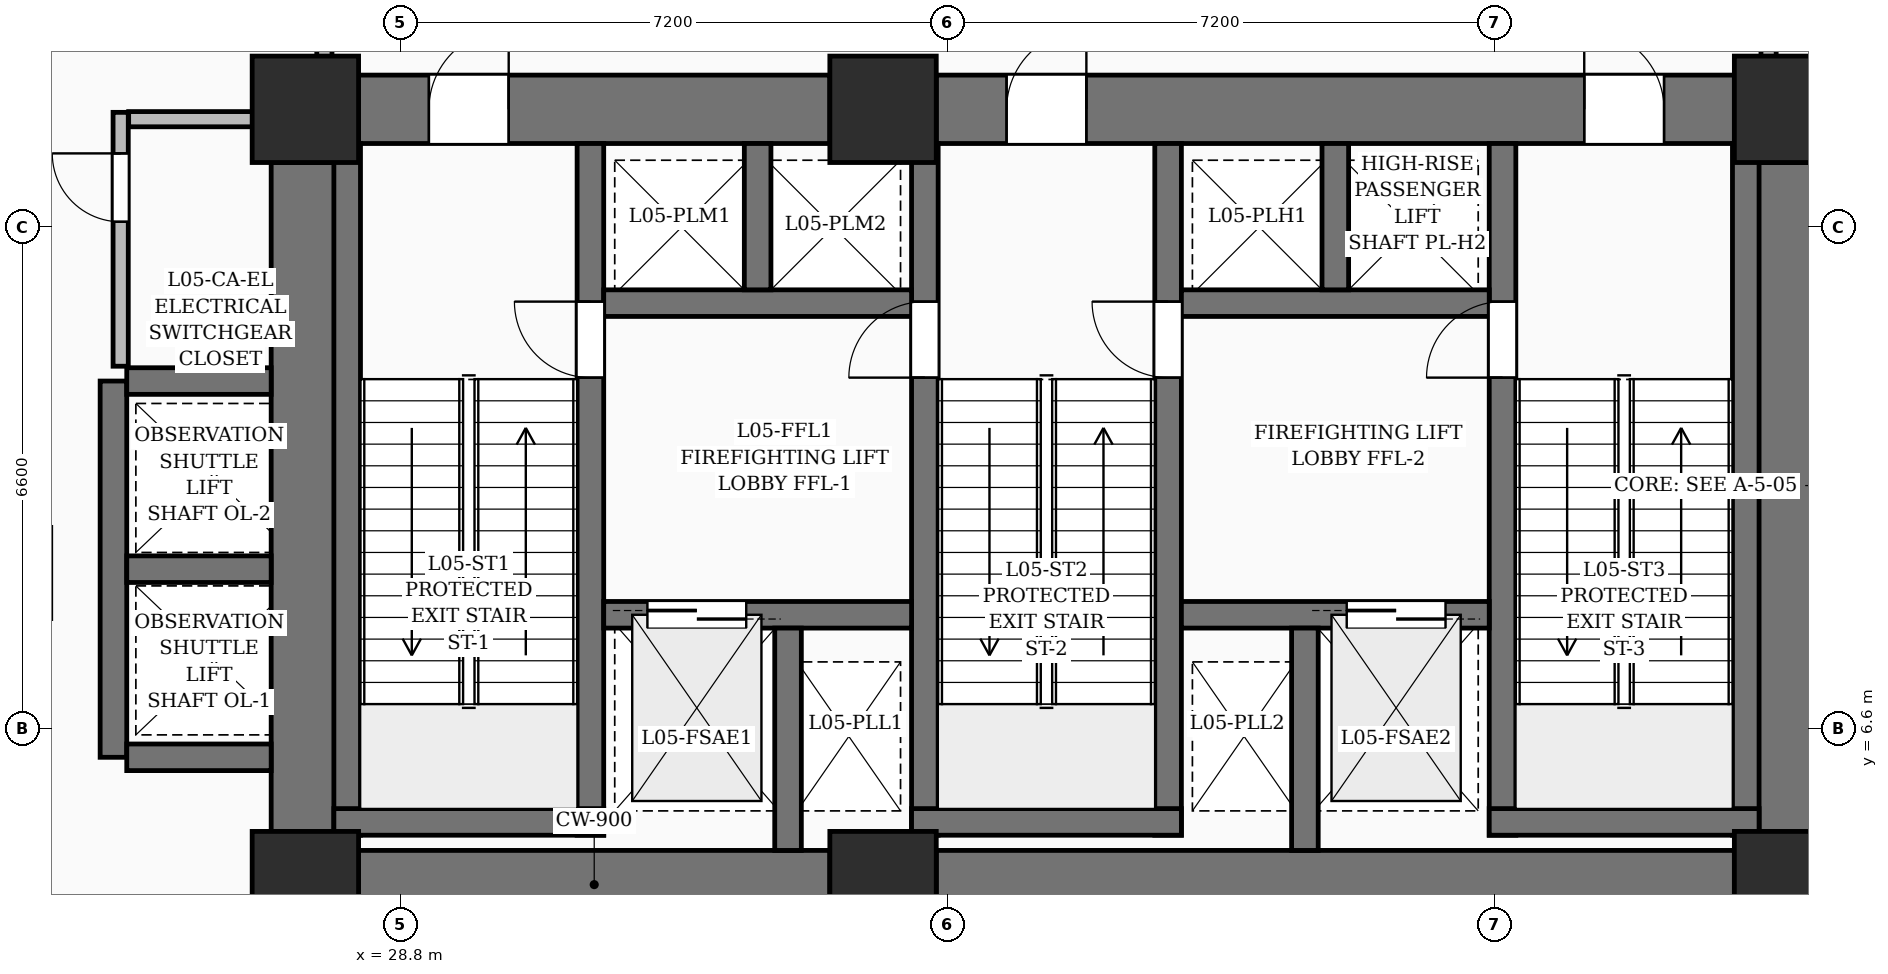
"""IFC4 building model, lengths in metres.
Left out: names, types, materials, properties, quantities, classifications, styles, units other than length and angle.
Written with IfcOpenShell. Run it as: python <this file> out.ifc"""

import sys

from ifc_helpers import new_model, si_unit, direction, frame, frame_2d, origin, origin_2d, place, context, subcontext, project, spatial, rectangle, extrude, element, fill, save


model = new_model("IFC4")
c1 = context("Model", 3, precision=1e-05, world=origin(), true_north=direction((0.0, 1.0)))
c2 = subcontext(c1, "Body", "Model", "MODEL_VIEW")
j1 = project(units=[si_unit("LENGTHUNIT", "METRE"), si_unit("PLANEANGLEUNIT", "RADIAN")], contexts=[c1])
p1 = place(None, origin())
s1 = spatial("IfcSite", under=j1, at=p1, CompositionType="ELEMENT")
p2 = place(p1, origin())
s2 = spatial("IfcBuilding", under=s1, at=p2, CompositionType="ELEMENT")
p3 = place(p2, frame((0.0, 0.0, 26.4)))
s3 = spatial("IfcBuildingStorey", under=s2, at=p3, CompositionType="ELEMENT", Elevation=26.4)
for number, where, z_axis, x_axis in (
    (1, (27.55, 4.55, 0.0), (0.0, 0.0, 1.0), (1.0, 0.0, 0.0)),
    (2, (35.15, 4.55, 0.0), (0.0, 0.0, 1.0), (1.0, 0.0, 0.0)),
    (3, (47.05, 4.55, 0.0), (0.0, 0.0, 1.0), (1.0, 0.0, 0.0)),
    (4, (27.55, 14.75, 0.0), (0.0, 0.0, 1.0), (1.0, 0.0, 0.0)),
    (5, (35.15, 14.75, 0.0), (0.0, 0.0, 1.0), (1.0, 0.0, 0.0)),
    (6, (47.05, 14.75, 0.0), (0.0, 0.0, 1.0), (1.0, 0.0, 0.0)),
):
    element("IfcColumn", number, at=place(p3, frame(where, z_axis=z_axis, x_axis=x_axis)), inside=s3, PredefinedType="COLUMN", context=c2, shape_type="SweptSolid", body=[
        extrude(rectangle(XDim=1.4, YDim=1.4, at=origin_2d()), origin(), (0.0, 0.0, 1.0), 5.4),
    ])
p4 = place(p3, frame((28.25, 4.55, 0.0), z_axis=(0.0, 0.0, 1.0), x_axis=(1.0, 0.0, 0.0)))
e7 = element("IfcWall", 7, at=p4, inside=s3, PredefinedType="SHEAR", context=c2, shape_type="SweptSolid", body=[
    extrude(rectangle(XDim=6.2, YDim=0.9, at=frame_2d((3.1, 0.0))), origin(), (0.0, 0.0, 1.0), 5.4),
])
p5 = place(p3, frame((35.85, 4.55, 0.0), z_axis=(0.0, 0.0, 1.0), x_axis=(1.0, 0.0, 0.0)))
e8 = element("IfcWall", 8, at=p5, inside=s3, PredefinedType="SHEAR", context=c2, shape_type="SweptSolid", body=[
    extrude(rectangle(XDim=10.5, YDim=0.9, at=frame_2d((5.25, 0.0))), origin(), (0.0, 0.0, 1.0), 5.4),
])
p6 = place(p3, frame((28.25, 14.75, 0.0), z_axis=(0.0, 0.0, 1.0), x_axis=(1.0, 0.0, 0.0)))
e9 = element("IfcWall", 9, at=p6, inside=s3, PredefinedType="SHEAR", context=c2, shape_type="SweptSolid", body=[
    extrude(rectangle(XDim=6.2, YDim=0.9, at=frame_2d((3.1, 0.0))), origin(), (0.0, 0.0, 1.0), 5.4),
])
p7 = place(p6, frame((0.925, 0.0, 0.0)))
e10 = element("IfcOpeningElement", 10, at=p7, cuts=e9, PredefinedType="OPENING", context=c2, shape_type="SweptSolid", body=[
    extrude(rectangle(XDim=1.05, YDim=2.15, at=frame_2d((0.525, 1.075))), frame((0.0, 0.46, 0.0), z_axis=(0.0, -1.0, 0.0), x_axis=(1.0, 0.0, 0.0)), (0.0, 0.0, 1.0), 0.92),
])
p8 = place(p3, frame((35.85, 14.75, 0.0), z_axis=(0.0, 0.0, 1.0), x_axis=(1.0, 0.0, 0.0)))
e11 = element("IfcWall", 11, at=p8, inside=s3, PredefinedType="SHEAR", context=c2, shape_type="SweptSolid", body=[
    extrude(rectangle(XDim=10.5, YDim=0.9, at=frame_2d((5.25, 0.0))), origin(), (0.0, 0.0, 1.0), 5.4),
])
p9 = place(p8, frame((0.925, 0.0, 0.0)))
e12 = element("IfcOpeningElement", 12, at=p9, cuts=e11, PredefinedType="OPENING", context=c2, shape_type="SweptSolid", body=[
    extrude(rectangle(XDim=1.05, YDim=2.15, at=frame_2d((0.525, 1.075))), frame((0.0, 0.46, 0.0), z_axis=(0.0, -1.0, 0.0), x_axis=(1.0, 0.0, 0.0)), (0.0, 0.0, 1.0), 0.92),
])
p10 = place(p8, frame((8.525, 0.0, 0.0)))
e13 = element("IfcOpeningElement", 13, at=p10, cuts=e11, PredefinedType="OPENING", context=c2, shape_type="SweptSolid", body=[
    extrude(rectangle(XDim=1.05, YDim=2.15, at=frame_2d((0.525, 1.075))), frame((0.0, 0.46, 0.0), z_axis=(0.0, -1.0, 0.0), x_axis=(1.0, 0.0, 0.0)), (0.0, 0.0, 1.0), 0.92),
])
for number, where, z_axis, x_axis in (
    (14, (27.55, 5.25, 0.0), (0.0, 0.0, 1.0), (0.0, 1.0, 0.0)),
    (15, (47.05, 5.25, 0.0), (0.0, 0.0, 1.0), (0.0, 1.0, 0.0)),
):
    element("IfcWall", number, at=place(p3, frame(where, z_axis=z_axis, x_axis=x_axis)), inside=s3, PredefinedType="SHEAR", context=c2, shape_type="SweptSolid", body=[
        extrude(rectangle(XDim=8.8, YDim=0.9, at=frame_2d((4.4, 0.0))), origin(), (0.0, 0.0, 1.0), 5.4),
    ])
p11 = place(p3, frame((28.1, 5.2, 0.0), z_axis=(0.0, 0.0, 1.0), x_axis=(0.0, 1.0, 0.0)))
e16 = element("IfcWall", 16, at=p11, inside=s3, PredefinedType="SOLIDWALL", context=c2, shape_type="SweptSolid", body=[
    extrude(rectangle(XDim=9.1, YDim=0.35, at=frame_2d((4.55, 0.0))), origin(), (0.0, 0.0, 1.0), 5.4),
])
p12 = place(p3, frame((31.3, 5.2, 0.0), z_axis=(0.0, 0.0, 1.0), x_axis=(0.0, 1.0, 0.0)))
e17 = element("IfcWall", 17, at=p12, inside=s3, PredefinedType="SOLIDWALL", context=c2, shape_type="SweptSolid", body=[
    extrude(rectangle(XDim=9.1, YDim=0.35, at=frame_2d((4.55, 0.0))), origin(), (0.0, 0.0, 1.0), 5.4),
])
p13 = place(p12, frame((6.02, 0.0, 0.0)))
e18 = element("IfcOpeningElement", 18, at=p13, cuts=e17, PredefinedType="OPENING", context=c2, shape_type="SweptSolid", body=[
    extrude(rectangle(XDim=1.0, YDim=2.15, at=frame_2d((0.5, 1.075))), frame((0.0, 0.185, 0.0), z_axis=(0.0, -1.0, 0.0), x_axis=(1.0, 0.0, 0.0)), (0.0, 0.0, 1.0), 0.37),
])
p14 = place(p3, frame((27.925, 5.375, 0.0), z_axis=(0.0, 0.0, 1.0), x_axis=(1.0, 0.0, 0.0)))
e19 = element("IfcWall", 19, at=p14, inside=s3, PredefinedType="SOLIDWALL", context=c2, shape_type="SweptSolid", body=[
    extrude(rectangle(XDim=3.55, YDim=0.35, at=frame_2d((1.775, 0.0))), origin(), (0.0, 0.0, 1.0), 5.4),
])
p15 = place(p3, frame((35.7, 5.2, 0.0), z_axis=(0.0, 0.0, 1.0), x_axis=(0.0, 1.0, 0.0)))
e20 = element("IfcWall", 20, at=p15, inside=s3, PredefinedType="SOLIDWALL", context=c2, shape_type="SweptSolid", body=[
    extrude(rectangle(XDim=9.1, YDim=0.35, at=frame_2d((4.55, 0.0))), origin(), (0.0, 0.0, 1.0), 5.4),
])
p16 = place(p15, frame((6.02, 0.0, 0.0)))
e21 = element("IfcOpeningElement", 21, at=p16, cuts=e20, PredefinedType="OPENING", context=c2, shape_type="SweptSolid", body=[
    extrude(rectangle(XDim=1.0, YDim=2.15, at=frame_2d((0.5, 1.075))), frame((0.0, 0.185, 0.0), z_axis=(0.0, -1.0, 0.0), x_axis=(1.0, 0.0, 0.0)), (0.0, 0.0, 1.0), 0.37),
])
p17 = place(p3, frame((38.9, 5.2, 0.0), z_axis=(0.0, 0.0, 1.0), x_axis=(0.0, 1.0, 0.0)))
e22 = element("IfcWall", 22, at=p17, inside=s3, PredefinedType="SOLIDWALL", context=c2, shape_type="SweptSolid", body=[
    extrude(rectangle(XDim=9.1, YDim=0.35, at=frame_2d((4.55, 0.0))), origin(), (0.0, 0.0, 1.0), 5.4),
])
p18 = place(p17, frame((6.02, 0.0, 0.0)))
e23 = element("IfcOpeningElement", 23, at=p18, cuts=e22, PredefinedType="OPENING", context=c2, shape_type="SweptSolid", body=[
    extrude(rectangle(XDim=1.0, YDim=2.15, at=frame_2d((0.5, 1.075))), frame((0.0, 0.185, 0.0), z_axis=(0.0, -1.0, 0.0), x_axis=(1.0, 0.0, 0.0)), (0.0, 0.0, 1.0), 0.37),
])
p19 = place(p3, frame((35.525, 5.375, 0.0), z_axis=(0.0, 0.0, 1.0), x_axis=(1.0, 0.0, 0.0)))
e24 = element("IfcWall", 24, at=p19, inside=s3, PredefinedType="SOLIDWALL", context=c2, shape_type="SweptSolid", body=[
    extrude(rectangle(XDim=3.55, YDim=0.35, at=frame_2d((1.775, 0.0))), origin(), (0.0, 0.0, 1.0), 5.4),
])
p20 = place(p3, frame((43.3, 5.2, 0.0), z_axis=(0.0, 0.0, 1.0), x_axis=(0.0, 1.0, 0.0)))
e25 = element("IfcWall", 25, at=p20, inside=s3, PredefinedType="SOLIDWALL", context=c2, shape_type="SweptSolid", body=[
    extrude(rectangle(XDim=9.1, YDim=0.35, at=frame_2d((4.55, 0.0))), origin(), (0.0, 0.0, 1.0), 5.4),
])
p21 = place(p20, frame((6.02, 0.0, 0.0)))
e26 = element("IfcOpeningElement", 26, at=p21, cuts=e25, PredefinedType="OPENING", context=c2, shape_type="SweptSolid", body=[
    extrude(rectangle(XDim=1.0, YDim=2.15, at=frame_2d((0.5, 1.075))), frame((0.0, 0.185, 0.0), z_axis=(0.0, -1.0, 0.0), x_axis=(1.0, 0.0, 0.0)), (0.0, 0.0, 1.0), 0.37),
])
p22 = place(p3, frame((46.5, 5.2, 0.0), z_axis=(0.0, 0.0, 1.0), x_axis=(0.0, 1.0, 0.0)))
e27 = element("IfcWall", 27, at=p22, inside=s3, PredefinedType="SOLIDWALL", context=c2, shape_type="SweptSolid", body=[
    extrude(rectangle(XDim=9.1, YDim=0.35, at=frame_2d((4.55, 0.0))), origin(), (0.0, 0.0, 1.0), 5.4),
])
p23 = place(p3, frame((43.125, 5.375, 0.0), z_axis=(0.0, 0.0, 1.0), x_axis=(1.0, 0.0, 0.0)))
e28 = element("IfcWall", 28, at=p23, inside=s3, PredefinedType="SOLIDWALL", context=c2, shape_type="SweptSolid", body=[
    extrude(rectangle(XDim=3.55, YDim=0.35, at=frame_2d((1.775, 0.0))), origin(), (0.0, 0.0, 1.0), 5.4),
])
p24 = place(p3, frame((31.475, 8.1, 0.0), z_axis=(0.0, 0.0, 1.0), x_axis=(1.0, 0.0, 0.0)))
e29 = element("IfcWall", 29, at=p24, inside=s3, PredefinedType="SOLIDWALL", context=c2, shape_type="SweptSolid", body=[
    extrude(rectangle(XDim=4.05, YDim=0.35, at=frame_2d((2.025, 0.0))), origin(), (0.0, 0.0, 1.0), 5.4),
])
p25 = place(p24, frame((0.575, 0.0, 0.0)))
e30 = element("IfcOpeningElement", 30, at=p25, cuts=e29, PredefinedType="OPENING", context=c2, shape_type="SweptSolid", body=[
    extrude(rectangle(XDim=1.3, YDim=2.25, at=frame_2d((0.65, 1.125))), frame((0.0, 0.185, 0.0), z_axis=(0.0, -1.0, 0.0), x_axis=(1.0, 0.0, 0.0)), (0.0, 0.0, 1.0), 0.37),
])
p26 = place(p3, frame((39.075, 8.1, 0.0), z_axis=(0.0, 0.0, 1.0), x_axis=(1.0, 0.0, 0.0)))
e31 = element("IfcWall", 31, at=p26, inside=s3, PredefinedType="SOLIDWALL", context=c2, shape_type="SweptSolid", body=[
    extrude(rectangle(XDim=4.05, YDim=0.35, at=frame_2d((2.025, 0.0))), origin(), (0.0, 0.0, 1.0), 5.4),
])
p27 = place(p26, frame((2.175, 0.0, 0.0)))
e32 = element("IfcOpeningElement", 32, at=p27, cuts=e31, PredefinedType="OPENING", context=c2, shape_type="SweptSolid", body=[
    extrude(rectangle(XDim=1.3, YDim=2.25, at=frame_2d((0.65, 1.125))), frame((0.0, 0.185, 0.0), z_axis=(0.0, -1.0, 0.0), x_axis=(1.0, 0.0, 0.0)), (0.0, 0.0, 1.0), 0.37),
])
for number, where, z_axis, x_axis in (
    (33, (33.9, 5.0, 0.0), (0.0, 0.0, 1.0), (0.0, 1.0, 0.0)),
    (34, (40.7, 5.0, 0.0), (0.0, 0.0, 1.0), (0.0, 1.0, 0.0)),
):
    element("IfcWall", number, at=place(p3, frame(where, z_axis=z_axis, x_axis=x_axis)), inside=s3, PredefinedType="SOLIDWALL", context=c2, shape_type="SweptSolid", body=[
        extrude(rectangle(XDim=2.925, YDim=0.35, at=frame_2d((1.462, 0.0))), origin(), (0.0, 0.0, 1.0), 5.4),
    ])
p28 = place(p3, frame((31.475, 12.2, 0.0), z_axis=(0.0, 0.0, 1.0), x_axis=(1.0, 0.0, 0.0)))
e35 = element("IfcWall", 35, at=p28, inside=s3, PredefinedType="SOLIDWALL", context=c2, shape_type="SweptSolid", body=[
    extrude(rectangle(XDim=4.05, YDim=0.35, at=frame_2d((2.025, 0.0))), origin(), (0.0, 0.0, 1.0), 5.4),
])
p29 = place(p3, frame((33.5, 12.375, 0.0), z_axis=(0.0, 0.0, 1.0), x_axis=(0.0, 1.0, 0.0)))
e36 = element("IfcWall", 36, at=p29, inside=s3, PredefinedType="SOLIDWALL", context=c2, shape_type="SweptSolid", body=[
    extrude(rectangle(XDim=1.925, YDim=0.35, at=frame_2d((0.962, 0.0))), origin(), (0.0, 0.0, 1.0), 5.4),
])
p30 = place(p3, frame((39.075, 12.2, 0.0), z_axis=(0.0, 0.0, 1.0), x_axis=(1.0, 0.0, 0.0)))
e37 = element("IfcWall", 37, at=p30, inside=s3, PredefinedType="SOLIDWALL", context=c2, shape_type="SweptSolid", body=[
    extrude(rectangle(XDim=4.05, YDim=0.35, at=frame_2d((2.025, 0.0))), origin(), (0.0, 0.0, 1.0), 5.4),
])
p31 = place(p3, frame((41.1, 12.375, 0.0), z_axis=(0.0, 0.0, 1.0), x_axis=(0.0, 1.0, 0.0)))
e38 = element("IfcWall", 38, at=p31, inside=s3, PredefinedType="SOLIDWALL", context=c2, shape_type="SweptSolid", body=[
    extrude(rectangle(XDim=1.925, YDim=0.35, at=frame_2d((0.962, 0.0))), origin(), (0.0, 0.0, 1.0), 5.4),
])
p32 = place(p3, frame((25.025, 6.225, 0.0), z_axis=(0.0, 0.0, 1.0), x_axis=(0.0, 1.0, 0.0)))
e39 = element("IfcWall", 39, at=p32, inside=s3, PredefinedType="SOLIDWALL", context=c2, shape_type="SweptSolid", body=[
    extrude(rectangle(XDim=4.95, YDim=0.35, at=frame_2d((2.475, 0.0))), origin(), (0.0, 0.0, 1.0), 5.4),
])
for number, where, z_axis, x_axis in (
    (40, (25.2, 6.225, 0.0), (0.0, 0.0, 1.0), (1.0, 0.0, 0.0)),
    (41, (25.2, 8.7, 0.0), (0.0, 0.0, 1.0), (1.0, 0.0, 0.0)),
    (42, (25.2, 11.175, 0.0), (0.0, 0.0, 1.0), (1.0, 0.0, 0.0)),
):
    element("IfcWall", number, at=place(p3, frame(where, z_axis=z_axis, x_axis=x_axis)), inside=s3, PredefinedType="SOLIDWALL", context=c2, shape_type="SweptSolid", body=[
        extrude(rectangle(XDim=1.9, YDim=0.35, at=frame_2d((0.95, 0.0))), origin(), (0.0, 0.0, 1.0), 5.4),
    ])
p33 = place(p3, frame((4.861, 6.142, 0.0), z_axis=(0.0, 0.0, 1.0), x_axis=(0.550210507218, 0.83502598627, 0.0)))
e43 = element("IfcWall", 43, at=p33, inside=s3, PredefinedType="PARAPET", context=c2, shape_type="SweptSolid", body=[
    extrude(rectangle(XDim=41.146, YDim=0.25, at=frame_2d((20.573, 0.0))), origin(), (0.0, 0.0, 1.0), 1.15),
])
p34 = place(p3, frame((47.2, 36.402, 0.0), z_axis=(0.0, 0.0, 1.0), x_axis=(0.550211524159, -0.835025316192, 0.0)))
e44 = element("IfcWall", 44, at=p34, inside=s3, PredefinedType="PARAPET", context=c2, shape_type="SweptSolid", body=[
    extrude(rectangle(XDim=36.239, YDim=0.25, at=frame_2d((18.119, 0.0))), origin(), (0.0, 0.0, 1.0), 1.15),
])
p35 = place(p3, frame((25.12, 11.37, 0.0), z_axis=(0.0, 0.0, 1.0), x_axis=(0.0, 1.0, 0.0)))
e45 = element("IfcWall", 45, at=p35, inside=s3, PredefinedType="PARTITIONING", context=c2, shape_type="SweptSolid", body=[
    extrude(rectangle(XDim=3.34, YDim=0.2, at=frame_2d((1.67, 0.0))), origin(), (0.0, 0.0, 1.0), 5.15),
])
p36 = place(p35, frame((1.9, 0.0, 0.0)))
e46 = element("IfcOpeningElement", 46, at=p36, cuts=e45, PredefinedType="OPENING", context=c2, shape_type="SweptSolid", body=[
    extrude(rectangle(XDim=0.9, YDim=2.1, at=frame_2d((0.45, 1.05))), frame((0.0, 0.11, 0.0), z_axis=(0.0, -1.0, 0.0), x_axis=(1.0, 0.0, 0.0)), (0.0, 0.0, 1.0), 0.22),
])
p37 = place(p3, frame((25.225, 14.62, 0.0), z_axis=(0.0, 0.0, 1.0), x_axis=(1.0, 0.0, 0.0)))
e47 = element("IfcWall", 47, at=p37, inside=s3, PredefinedType="PARTITIONING", context=c2, shape_type="SweptSolid", body=[
    extrude(rectangle(XDim=1.86, YDim=0.2, at=frame_2d((0.93, 0.0))), origin(), (0.0, 0.0, 1.0), 5.15),
])
p38 = place(p3, frame((46.8, 15.2, 0.0), z_axis=(0.0, 0.0, 1.0), x_axis=(0.0, 1.0, 0.0)))
e48 = element("IfcWall", 48, at=p38, inside=s3, PredefinedType="PARTITIONING", context=c2, shape_type="SweptSolid", body=[
    extrude(rectangle(XDim=2.265, YDim=0.2, at=frame_2d((1.133, 0.0))), origin(), (0.0, 0.0, 1.0), 4.109),
])
p39 = place(p38, frame((0.725, 0.0, 0.0)))
e49 = element("IfcOpeningElement", 49, at=p39, cuts=e48, PredefinedType="OPENING", context=c2, shape_type="SweptSolid", body=[
    extrude(rectangle(XDim=0.9, YDim=2.1, at=frame_2d((0.45, 1.05))), frame((0.0, 0.11, 0.0), z_axis=(0.0, -1.0, 0.0), x_axis=(1.0, 0.0, 0.0)), (0.0, 0.0, 1.0), 0.22),
])
p40 = place(p3, frame((27.8, 17.465, 0.0), z_axis=(0.0, 0.0, 1.0), x_axis=(0.0, -1.0, 0.0)))
e50 = element("IfcWall", 50, at=p40, inside=s3, PredefinedType="PARTITIONING", context=c2, shape_type="SweptSolid", body=[
    extrude(rectangle(XDim=2.265, YDim=0.2, at=frame_2d((1.133, 0.0))), origin(), (0.0, 0.0, 1.0), 5.15),
])
p41 = place(p40, frame((0.64, 0.0, 0.0)))
e51 = element("IfcOpeningElement", 51, at=p41, cuts=e50, PredefinedType="OPENING", context=c2, shape_type="SweptSolid", body=[
    extrude(rectangle(XDim=0.9, YDim=2.1, at=frame_2d((0.45, 1.05))), frame((0.0, 0.11, 0.0), z_axis=(0.0, -1.0, 0.0), x_axis=(1.0, 0.0, 0.0)), (0.0, 0.0, 1.0), 0.22),
])
p42 = place(p7, origin())
e52 = element("IfcDoor", 52, at=p42, inside=s3, OperationType="SINGLE_SWING_RIGHT", PredefinedType="DOOR", context=c2, shape_type="SweptSolid", body=[
    extrude(rectangle(XDim=1.05, YDim=2.15, at=frame_2d((0.525, 1.075))), frame((0.0, 0.025, 0.0), z_axis=(0.0, -1.0, 0.0), x_axis=(1.0, 0.0, 0.0)), (0.0, 0.0, 1.0), 0.05),
])
fill(e10, e52)
p43 = place(p9, origin())
e53 = element("IfcDoor", 53, at=p43, inside=s3, OperationType="SINGLE_SWING_RIGHT", PredefinedType="DOOR", context=c2, shape_type="SweptSolid", body=[
    extrude(rectangle(XDim=1.05, YDim=2.15, at=frame_2d((0.525, 1.075))), frame((0.0, 0.025, 0.0), z_axis=(0.0, -1.0, 0.0), x_axis=(1.0, 0.0, 0.0)), (0.0, 0.0, 1.0), 0.05),
])
fill(e12, e53)
p44 = place(p10, origin())
e54 = element("IfcDoor", 54, at=p44, inside=s3, OperationType="SINGLE_SWING_LEFT", PredefinedType="DOOR", context=c2, shape_type="SweptSolid", body=[
    extrude(rectangle(XDim=1.05, YDim=2.15, at=frame_2d((0.525, 1.075))), frame((0.0, 0.025, 0.0), z_axis=(0.0, -1.0, 0.0), x_axis=(1.0, 0.0, 0.0)), (0.0, 0.0, 1.0), 0.05),
])
fill(e13, e54)
p45 = place(p13, origin())
e55 = element("IfcDoor", 55, at=p45, inside=s3, OperationType="SINGLE_SWING_RIGHT", PredefinedType="DOOR", context=c2, shape_type="SweptSolid", body=[
    extrude(rectangle(XDim=1.0, YDim=2.15, at=frame_2d((0.5, 1.075))), frame((0.0, 0.025, 0.0), z_axis=(0.0, -1.0, 0.0), x_axis=(1.0, 0.0, 0.0)), (0.0, 0.0, 1.0), 0.05),
])
fill(e18, e55)
p46 = place(p16, origin())
e56 = element("IfcDoor", 56, at=p46, inside=s3, OperationType="SINGLE_SWING_LEFT", PredefinedType="DOOR", context=c2, shape_type="SweptSolid", body=[
    extrude(rectangle(XDim=1.0, YDim=2.15, at=frame_2d((0.5, 1.075))), frame((0.0, 0.025, 0.0), z_axis=(0.0, -1.0, 0.0), x_axis=(1.0, 0.0, 0.0)), (0.0, 0.0, 1.0), 0.05),
])
fill(e21, e56)
p47 = place(p18, origin())
e57 = element("IfcDoor", 57, at=p47, inside=s3, OperationType="SINGLE_SWING_RIGHT", PredefinedType="DOOR", context=c2, shape_type="SweptSolid", body=[
    extrude(rectangle(XDim=1.0, YDim=2.15, at=frame_2d((0.5, 1.075))), frame((0.0, 0.025, 0.0), z_axis=(0.0, -1.0, 0.0), x_axis=(1.0, 0.0, 0.0)), (0.0, 0.0, 1.0), 0.05),
])
fill(e23, e57)
p48 = place(p21, origin())
e58 = element("IfcDoor", 58, at=p48, inside=s3, OperationType="SINGLE_SWING_LEFT", PredefinedType="DOOR", context=c2, shape_type="SweptSolid", body=[
    extrude(rectangle(XDim=1.0, YDim=2.15, at=frame_2d((0.5, 1.075))), frame((0.0, 0.025, 0.0), z_axis=(0.0, -1.0, 0.0), x_axis=(1.0, 0.0, 0.0)), (0.0, 0.0, 1.0), 0.05),
])
fill(e26, e58)
p49 = place(p25, origin())
e59 = element("IfcDoor", 59, at=p49, inside=s3, OperationType="DOUBLE_DOOR_SLIDING", PredefinedType="DOOR", context=c2, shape_type="SweptSolid", body=[
    extrude(rectangle(XDim=1.3, YDim=2.25, at=frame_2d((0.65, 1.125))), frame((0.0, 0.025, 0.0), z_axis=(0.0, -1.0, 0.0), x_axis=(1.0, 0.0, 0.0)), (0.0, 0.0, 1.0), 0.05),
])
fill(e30, e59)
p50 = place(p27, origin())
e60 = element("IfcDoor", 60, at=p50, inside=s3, OperationType="DOUBLE_DOOR_SLIDING", PredefinedType="DOOR", context=c2, shape_type="SweptSolid", body=[
    extrude(rectangle(XDim=1.3, YDim=2.25, at=frame_2d((0.65, 1.125))), frame((0.0, 0.025, 0.0), z_axis=(0.0, -1.0, 0.0), x_axis=(1.0, 0.0, 0.0)), (0.0, 0.0, 1.0), 0.05),
])
fill(e32, e60)
p51 = place(p36, origin())
e61 = element("IfcDoor", 61, at=p51, inside=s3, OperationType="SINGLE_SWING_RIGHT", PredefinedType="DOOR", context=c2, shape_type="SweptSolid", body=[
    extrude(rectangle(XDim=0.9, YDim=2.1, at=frame_2d((0.45, 1.05))), frame((0.0, 0.025, 0.0), z_axis=(0.0, -1.0, 0.0), x_axis=(1.0, 0.0, 0.0)), (0.0, 0.0, 1.0), 0.05),
])
fill(e46, e61)
save(model, sys.argv[1])
